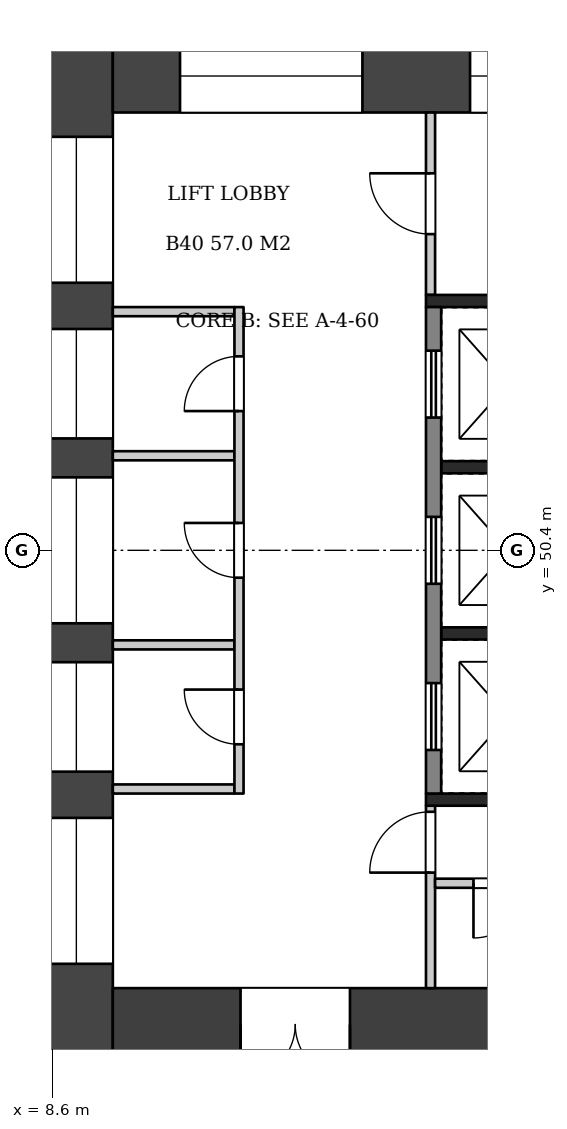
"""IFC4 building model, lengths in metres.
Left out: names, types, materials, properties, quantities, classifications, styles, units other than length and angle.
Written with IfcOpenShell. Run it as: python <this file> out.ifc"""

import sys

from ifc_helpers import new_model, si_unit, direction, frame, frame_2d, origin, place, context, subcontext, project, spatial, rectangle, extrude, element, fill, save


model = new_model("IFC4")
c1 = context("Model", 3, precision=1e-05, world=origin(), true_north=direction((0.0, 1.0)))
c2 = subcontext(c1, "Body", "Model", "MODEL_VIEW")
j1 = project(units=[si_unit("LENGTHUNIT", "METRE"), si_unit("PLANEANGLEUNIT", "RADIAN")], contexts=[c1])
p1 = place(None, origin())
s1 = spatial("IfcSite", under=j1, at=p1, CompositionType="ELEMENT")
p2 = place(p1, origin())
s2 = spatial("IfcBuilding", under=s1, at=p2, CompositionType="ELEMENT")
p3 = place(p2, frame((0.0, 0.0, 158.2)))
s3 = spatial("IfcBuildingStorey", under=s2, at=p3, CompositionType="ELEMENT", Elevation=158.2)
p4 = place(p3, frame((9.0, 58.8, 0.0), z_axis=(0.0, 0.0, 1.0), x_axis=(0.0, -1.0, 0.0)))
e1 = element("IfcWall", 1, at=p4, inside=s3, PredefinedType="SHEAR", context=c2, shape_type="SweptSolid", body=[
    extrude(rectangle(XDim=16.8, YDim=1.2, at=frame_2d((8.4, 0.0))), origin(), (0.0, 0.0, 1.0), 3.22),
])
p5 = place(p4, frame((1.6, 0.0, 0.6)))
e2 = element("IfcOpeningElement", 2, at=p5, cuts=e1, PredefinedType="OPENING", context=c2, shape_type="SweptSolid", body=[
    extrude(rectangle(XDim=2.4, YDim=2.1, at=frame_2d((1.2, 1.05))), frame((0.0, 0.61, 0.0), z_axis=(0.0, -1.0, 0.0), x_axis=(1.0, 0.0, 0.0)), (0.0, 0.0, 1.0), 1.22),
])
p6 = place(p4, frame((4.76, 0.0, 1.6)))
e3 = element("IfcOpeningElement", 3, at=p6, cuts=e1, PredefinedType="OPENING", context=c2, shape_type="SweptSolid", body=[
    extrude(rectangle(XDim=1.8, YDim=1.2, at=frame_2d((0.9, 0.6))), frame((0.0, 0.61, 0.0), z_axis=(0.0, -1.0, 0.0), x_axis=(1.0, 0.0, 0.0)), (0.0, 0.0, 1.0), 1.22),
])
p7 = place(p4, frame((7.2, 0.0, 1.6)))
e4 = element("IfcOpeningElement", 4, at=p7, cuts=e1, PredefinedType="OPENING", context=c2, shape_type="SweptSolid", body=[
    extrude(rectangle(XDim=2.4, YDim=1.2, at=frame_2d((1.2, 0.6))), frame((0.0, 0.61, 0.0), z_axis=(0.0, -1.0, 0.0), x_axis=(1.0, 0.0, 0.0)), (0.0, 0.0, 1.0), 1.22),
])
p8 = place(p4, frame((10.24, 0.0, 1.6)))
e5 = element("IfcOpeningElement", 5, at=p8, cuts=e1, PredefinedType="OPENING", context=c2, shape_type="SweptSolid", body=[
    extrude(rectangle(XDim=1.8, YDim=1.2, at=frame_2d((0.9, 0.6))), frame((0.0, 0.61, 0.0), z_axis=(0.0, -1.0, 0.0), x_axis=(1.0, 0.0, 0.0)), (0.0, 0.0, 1.0), 1.22),
])
p9 = place(p4, frame((12.8, 0.0, 0.6)))
e6 = element("IfcOpeningElement", 6, at=p9, cuts=e1, PredefinedType="OPENING", context=c2, shape_type="SweptSolid", body=[
    extrude(rectangle(XDim=2.4, YDim=2.1, at=frame_2d((1.2, 1.05))), frame((0.0, 0.61, 0.0), z_axis=(0.0, -1.0, 0.0), x_axis=(1.0, 0.0, 0.0)), (0.0, 0.0, 1.0), 1.22),
])
p10 = place(p3, frame((9.6, 58.2, 0.0), z_axis=(0.0, 0.0, 1.0), x_axis=(1.0, 0.0, 0.0)))
e7 = element("IfcWall", 7, at=p10, inside=s3, PredefinedType="SHEAR", context=c2, shape_type="SweptSolid", body=[
    extrude(rectangle(XDim=14.4, YDim=1.2, at=frame_2d((7.2, 0.0))), origin(), (0.0, 0.0, 1.0), 3.22),
])
p11 = place(p10, frame((1.105, 0.0, 0.6)))
e8 = element("IfcOpeningElement", 8, at=p11, cuts=e7, PredefinedType="OPENING", context=c2, shape_type="SweptSolid", body=[
    extrude(rectangle(XDim=3.0, YDim=2.1, at=frame_2d((1.5, 1.05))), frame((0.0, 0.61, 0.0), z_axis=(0.0, -1.0, 0.0), x_axis=(1.0, 0.0, 0.0)), (0.0, 0.0, 1.0), 1.22),
])
p12 = place(p10, frame((5.875, 0.0, 0.6)))
e9 = element("IfcOpeningElement", 9, at=p12, cuts=e7, PredefinedType="OPENING", context=c2, shape_type="SweptSolid", body=[
    extrude(rectangle(XDim=2.4, YDim=2.1, at=frame_2d((1.2, 1.05))), frame((0.0, 0.61, 0.0), z_axis=(0.0, -1.0, 0.0), x_axis=(1.0, 0.0, 0.0)), (0.0, 0.0, 1.0), 1.22),
])
p13 = place(p10, frame((9.993, 0.0, 0.5)))
e10 = element("IfcOpeningElement", 10, at=p13, cuts=e7, PredefinedType="OPENING", context=c2, shape_type="SweptSolid", body=[
    extrude(rectangle(XDim=1.2, YDim=2.4, at=frame_2d((0.6, 1.2))), frame((0.0, 0.61, 0.0), z_axis=(0.0, -1.0, 0.0), x_axis=(1.0, 0.0, 0.0)), (0.0, 0.0, 1.0), 1.22),
])
p14 = place(p10, frame((12.197, 0.0, 0.5)))
e11 = element("IfcOpeningElement", 11, at=p14, cuts=e7, PredefinedType="OPENING", context=c2, shape_type="SweptSolid", body=[
    extrude(rectangle(XDim=1.2, YDim=2.4, at=frame_2d((0.6, 1.2))), frame((0.0, 0.61, 0.0), z_axis=(0.0, -1.0, 0.0), x_axis=(1.0, 0.0, 0.0)), (0.0, 0.0, 1.0), 1.22),
])
p15 = place(p3, frame((9.6, 42.6, 0.0), z_axis=(0.0, 0.0, 1.0), x_axis=(1.0, 0.0, 0.0)))
e12 = element("IfcWall", 12, at=p15, inside=s3, PredefinedType="SHEAR", context=c2, shape_type="SweptSolid", body=[
    extrude(rectangle(XDim=14.4, YDim=1.2, at=frame_2d((7.2, 0.0))), origin(), (0.0, 0.0, 1.0), 3.22),
])
p16 = place(p15, frame((2.1, 0.0, 0.0)))
e13 = element("IfcOpeningElement", 13, at=p16, cuts=e12, PredefinedType="OPENING", context=c2, shape_type="SweptSolid", body=[
    extrude(rectangle(XDim=1.8, YDim=2.1, at=frame_2d((0.9, 1.05))), frame((0.0, 0.61, 0.0), z_axis=(0.0, -1.0, 0.0), x_axis=(1.0, 0.0, 0.0)), (0.0, 0.0, 1.0), 1.22),
])
for number, where, z_axis, x_axis in (
    (14, (9.6, 54.325, 0.0), (0.0, 0.0, 1.0), (1.0, 0.0, 0.0)),
    (15, (9.6, 46.475, 0.0), (0.0, 0.0, 1.0), (1.0, 0.0, 0.0)),
    (16, (9.6, 51.955, 0.0), (0.0, 0.0, 1.0), (1.0, 0.0, 0.0)),
    (17, (9.6, 48.845, 0.0), (0.0, 0.0, 1.0), (1.0, 0.0, 0.0)),
):
    element("IfcWall", number, at=place(p3, frame(where, z_axis=z_axis, x_axis=x_axis)), inside=s3, PredefinedType="PARTITIONING", context=c2, shape_type="SweptSolid", body=[
        extrude(rectangle(XDim=2.0, YDim=0.15, at=frame_2d((1.0, 0.0))), origin(), (0.0, 0.0, 1.0), 3.22),
    ])
p17 = place(p3, frame((11.675, 54.4, 0.0), z_axis=(0.0, 0.0, 1.0), x_axis=(0.0, -1.0, 0.0)))
e18 = element("IfcWall", 18, at=p17, inside=s3, PredefinedType="PARTITIONING", context=c2, shape_type="SweptSolid", body=[
    extrude(rectangle(XDim=8.0, YDim=0.15, at=frame_2d((4.0, 0.0))), origin(), (0.0, 0.0, 1.0), 3.22),
])
p18 = place(p17, frame((0.81, 0.0, 0.0)))
e19 = element("IfcOpeningElement", 19, at=p18, cuts=e18, PredefinedType="OPENING", context=c2, shape_type="SweptSolid", body=[
    extrude(rectangle(XDim=0.9, YDim=2.1, at=frame_2d((0.45, 1.05))), frame((0.0, 0.085, 0.0), z_axis=(0.0, -1.0, 0.0), x_axis=(1.0, 0.0, 0.0)), (0.0, 0.0, 1.0), 0.17),
])
p19 = place(p17, frame((3.55, 0.0, 0.0)))
e20 = element("IfcOpeningElement", 20, at=p19, cuts=e18, PredefinedType="OPENING", context=c2, shape_type="SweptSolid", body=[
    extrude(rectangle(XDim=0.9, YDim=2.1, at=frame_2d((0.45, 1.05))), frame((0.0, 0.085, 0.0), z_axis=(0.0, -1.0, 0.0), x_axis=(1.0, 0.0, 0.0)), (0.0, 0.0, 1.0), 0.17),
])
p20 = place(p17, frame((6.29, 0.0, 0.0)))
e21 = element("IfcOpeningElement", 21, at=p20, cuts=e18, PredefinedType="OPENING", context=c2, shape_type="SweptSolid", body=[
    extrude(rectangle(XDim=0.9, YDim=2.1, at=frame_2d((0.45, 1.05))), frame((0.0, 0.085, 0.0), z_axis=(0.0, -1.0, 0.0), x_axis=(1.0, 0.0, 0.0)), (0.0, 0.0, 1.0), 0.17),
])
for number, where, z_axis, x_axis in (
    (22, (15.0, 51.767, 0.0), (0.0, 0.0, 1.0), (1.0, 0.0, 0.0)),
    (23, (15.0, 49.033, 0.0), (0.0, 0.0, 1.0), (1.0, 0.0, 0.0)),
):
    element("IfcWall", number, at=place(p3, frame(where, z_axis=z_axis, x_axis=x_axis)), inside=s3, PredefinedType="SHEAR", context=c2, shape_type="SweptSolid", body=[
        extrude(rectangle(XDim=1.9, YDim=0.2, at=frame_2d((0.95, 0.0))), origin(), (0.0, 0.0, 1.0), 3.22),
    ])
p21 = place(p3, frame((14.875, 54.4, 0.0), z_axis=(0.0, 0.0, 1.0), x_axis=(0.0, -1.0, 0.0)))
e24 = element("IfcWall", 24, at=p21, inside=s3, PredefinedType="SHEAR", context=c2, shape_type="SweptSolid", body=[
    extrude(rectangle(XDim=8.0, YDim=0.25, at=frame_2d((4.0, 0.0))), origin(), (0.0, 0.0, 1.0), 3.22),
])
p22 = place(p21, frame((0.717, 0.0, 0.0)))
e25 = element("IfcOpeningElement", 25, at=p22, cuts=e24, PredefinedType="OPENING", context=c2, shape_type="SweptSolid", body=[
    extrude(rectangle(XDim=1.1, YDim=2.1, at=frame_2d((0.55, 1.05))), frame((0.0, 0.135, 0.0), z_axis=(0.0, -1.0, 0.0), x_axis=(1.0, 0.0, 0.0)), (0.0, 0.0, 1.0), 0.27),
])
p23 = place(p21, frame((3.45, 0.0, 0.0)))
e26 = element("IfcOpeningElement", 26, at=p23, cuts=e24, PredefinedType="OPENING", context=c2, shape_type="SweptSolid", body=[
    extrude(rectangle(XDim=1.1, YDim=2.1, at=frame_2d((0.55, 1.05))), frame((0.0, 0.135, 0.0), z_axis=(0.0, -1.0, 0.0), x_axis=(1.0, 0.0, 0.0)), (0.0, 0.0, 1.0), 0.27),
])
p24 = place(p21, frame((6.183, 0.0, 0.0)))
e27 = element("IfcOpeningElement", 27, at=p24, cuts=e24, PredefinedType="OPENING", context=c2, shape_type="SweptSolid", body=[
    extrude(rectangle(XDim=1.1, YDim=2.1, at=frame_2d((0.55, 1.05))), frame((0.0, 0.135, 0.0), z_axis=(0.0, -1.0, 0.0), x_axis=(1.0, 0.0, 0.0)), (0.0, 0.0, 1.0), 0.27),
])
p25 = place(p3, frame((14.75, 54.5, 0.0), z_axis=(0.0, 0.0, 1.0), x_axis=(1.0, 0.0, 0.0)))
e28 = element("IfcWall", 28, at=p25, inside=s3, PredefinedType="SHEAR", context=c2, shape_type="SweptSolid", body=[
    extrude(rectangle(XDim=2.4, YDim=0.2, at=frame_2d((1.2, 0.0))), origin(), (0.0, 0.0, 1.0), 3.22),
])
p26 = place(p3, frame((14.825, 57.6, 0.0), z_axis=(0.0, 0.0, 1.0), x_axis=(0.0, -1.0, 0.0)))
e29 = element("IfcWall", 29, at=p26, inside=s3, PredefinedType="PARTITIONING", context=c2, shape_type="SweptSolid", body=[
    extrude(rectangle(XDim=3.0, YDim=0.15, at=frame_2d((1.5, 0.0))), origin(), (0.0, 0.0, 1.0), 3.22),
])
p27 = place(p26, frame((1.0, 0.0, 0.0)))
e30 = element("IfcOpeningElement", 30, at=p27, cuts=e29, PredefinedType="OPENING", context=c2, shape_type="SweptSolid", body=[
    extrude(rectangle(XDim=1.0, YDim=2.1, at=frame_2d((0.5, 1.05))), frame((0.0, 0.085, 0.0), z_axis=(0.0, -1.0, 0.0), x_axis=(1.0, 0.0, 0.0)), (0.0, 0.0, 1.0), 0.17),
])
p28 = place(p3, frame((14.75, 46.3, 0.0), z_axis=(0.0, 0.0, 1.0), x_axis=(1.0, 0.0, 0.0)))
e31 = element("IfcWall", 31, at=p28, inside=s3, PredefinedType="SHEAR", context=c2, shape_type="SweptSolid", body=[
    extrude(rectangle(XDim=9.25, YDim=0.2, at=frame_2d((4.625, 0.0))), origin(), (0.0, 0.0, 1.0), 3.22),
])
p29 = place(p3, frame((14.825, 46.2, 0.0), z_axis=(0.0, 0.0, 1.0), x_axis=(0.0, -1.0, 0.0)))
e32 = element("IfcWall", 32, at=p29, inside=s3, PredefinedType="PARTITIONING", context=c2, shape_type="SweptSolid", body=[
    extrude(rectangle(XDim=3.0, YDim=0.15, at=frame_2d((1.5, 0.0))), origin(), (0.0, 0.0, 1.0), 3.22),
])
p30 = place(p29, frame((0.1, 0.0, 0.0)))
e33 = element("IfcOpeningElement", 33, at=p30, cuts=e32, PredefinedType="OPENING", context=c2, shape_type="SweptSolid", body=[
    extrude(rectangle(XDim=1.0, YDim=2.1, at=frame_2d((0.5, 1.05))), frame((0.0, 0.085, 0.0), z_axis=(0.0, -1.0, 0.0), x_axis=(1.0, 0.0, 0.0)), (0.0, 0.0, 1.0), 0.17),
])
p31 = place(p3, frame((14.9, 44.925, 0.0), z_axis=(0.0, 0.0, 1.0), x_axis=(1.0, 0.0, 0.0)))
e34 = element("IfcWall", 34, at=p31, inside=s3, PredefinedType="PARTITIONING", context=c2, shape_type="SweptSolid", body=[
    extrude(rectangle(XDim=9.1, YDim=0.15, at=frame_2d((4.55, 0.0))), origin(), (0.0, 0.0, 1.0), 3.22),
])
p32 = place(p31, frame((0.631, 0.0, 0.0)))
e35 = element("IfcOpeningElement", 35, at=p32, cuts=e34, PredefinedType="OPENING", context=c2, shape_type="SweptSolid", body=[
    extrude(rectangle(XDim=0.9, YDim=2.1, at=frame_2d((0.45, 1.05))), frame((0.0, 0.085, 0.0), z_axis=(0.0, -1.0, 0.0), x_axis=(1.0, 0.0, 0.0)), (0.0, 0.0, 1.0), 0.17),
])
p33 = place(p31, frame((2.944, 0.0, 0.0)))
e36 = element("IfcOpeningElement", 36, at=p33, cuts=e34, PredefinedType="OPENING", context=c2, shape_type="SweptSolid", body=[
    extrude(rectangle(XDim=0.9, YDim=2.1, at=frame_2d((0.45, 1.05))), frame((0.0, 0.085, 0.0), z_axis=(0.0, -1.0, 0.0), x_axis=(1.0, 0.0, 0.0)), (0.0, 0.0, 1.0), 0.17),
])
p34 = place(p31, frame((5.256, 0.0, 0.0)))
e37 = element("IfcOpeningElement", 37, at=p34, cuts=e34, PredefinedType="OPENING", context=c2, shape_type="SweptSolid", body=[
    extrude(rectangle(XDim=0.9, YDim=2.1, at=frame_2d((0.45, 1.05))), frame((0.0, 0.085, 0.0), z_axis=(0.0, -1.0, 0.0), x_axis=(1.0, 0.0, 0.0)), (0.0, 0.0, 1.0), 0.17),
])
p35 = place(p31, frame((7.569, 0.0, 0.0)))
e38 = element("IfcOpeningElement", 38, at=p35, cuts=e34, PredefinedType="OPENING", context=c2, shape_type="SweptSolid", body=[
    extrude(rectangle(XDim=0.9, YDim=2.1, at=frame_2d((0.45, 1.05))), frame((0.0, 0.085, 0.0), z_axis=(0.0, -1.0, 0.0), x_axis=(1.0, 0.0, 0.0)), (0.0, 0.0, 1.0), 0.17),
])
p36 = place(p16, frame((1.8, 0.0, 0.0), z_axis=(0.0, 0.0, 1.0), x_axis=(-1.0, 0.0, 0.0)))
e39 = element("IfcDoor", 39, at=p36, inside=s3, OperationType="DOUBLE_DOOR_SINGLE_SWING", PredefinedType="DOOR", context=c2, shape_type="SweptSolid", body=[
    extrude(rectangle(XDim=1.8, YDim=2.1, at=frame_2d((0.9, 1.05))), frame((0.0, 0.025, 0.0), z_axis=(0.0, -1.0, 0.0), x_axis=(1.0, 0.0, 0.0)), (0.0, 0.0, 1.0), 0.05),
])
fill(e13, e39)
p37 = place(p18, frame((0.9, 0.0, 0.0), z_axis=(0.0, 0.0, 1.0), x_axis=(-1.0, 0.0, 0.0)))
e40 = element("IfcDoor", 40, at=p37, inside=s3, OperationType="SINGLE_SWING_LEFT", PredefinedType="DOOR", context=c2, shape_type="SweptSolid", body=[
    extrude(rectangle(XDim=0.9, YDim=2.1, at=frame_2d((0.45, 1.05))), frame((0.0, 0.025, 0.0), z_axis=(0.0, -1.0, 0.0), x_axis=(1.0, 0.0, 0.0)), (0.0, 0.0, 1.0), 0.05),
])
fill(e19, e40)
p38 = place(p19, frame((0.9, 0.0, 0.0), z_axis=(0.0, 0.0, 1.0), x_axis=(-1.0, 0.0, 0.0)))
e41 = element("IfcDoor", 41, at=p38, inside=s3, OperationType="SINGLE_SWING_RIGHT", PredefinedType="DOOR", context=c2, shape_type="SweptSolid", body=[
    extrude(rectangle(XDim=0.9, YDim=2.1, at=frame_2d((0.45, 1.05))), frame((0.0, 0.025, 0.0), z_axis=(0.0, -1.0, 0.0), x_axis=(1.0, 0.0, 0.0)), (0.0, 0.0, 1.0), 0.05),
])
fill(e20, e41)
p39 = place(p20, frame((0.9, 0.0, 0.0), z_axis=(0.0, 0.0, 1.0), x_axis=(-1.0, 0.0, 0.0)))
e42 = element("IfcDoor", 42, at=p39, inside=s3, OperationType="SINGLE_SWING_RIGHT", PredefinedType="DOOR", context=c2, shape_type="SweptSolid", body=[
    extrude(rectangle(XDim=0.9, YDim=2.1, at=frame_2d((0.45, 1.05))), frame((0.0, 0.025, 0.0), z_axis=(0.0, -1.0, 0.0), x_axis=(1.0, 0.0, 0.0)), (0.0, 0.0, 1.0), 0.05),
])
fill(e21, e42)
p40 = place(p22, origin())
e43 = element("IfcDoor", 43, at=p40, inside=s3, OperationType="DOUBLE_DOOR_SLIDING", PredefinedType="DOOR", context=c2, shape_type="SweptSolid", body=[
    extrude(rectangle(XDim=1.1, YDim=2.1, at=frame_2d((0.55, 1.05))), frame((0.0, 0.025, 0.0), z_axis=(0.0, -1.0, 0.0), x_axis=(1.0, 0.0, 0.0)), (0.0, 0.0, 1.0), 0.05),
])
fill(e25, e43)
p41 = place(p23, origin())
e44 = element("IfcDoor", 44, at=p41, inside=s3, OperationType="DOUBLE_DOOR_SLIDING", PredefinedType="DOOR", context=c2, shape_type="SweptSolid", body=[
    extrude(rectangle(XDim=1.1, YDim=2.1, at=frame_2d((0.55, 1.05))), frame((0.0, 0.025, 0.0), z_axis=(0.0, -1.0, 0.0), x_axis=(1.0, 0.0, 0.0)), (0.0, 0.0, 1.0), 0.05),
])
fill(e26, e44)
p42 = place(p24, origin())
e45 = element("IfcDoor", 45, at=p42, inside=s3, OperationType="DOUBLE_DOOR_SLIDING", PredefinedType="DOOR", context=c2, shape_type="SweptSolid", body=[
    extrude(rectangle(XDim=1.1, YDim=2.1, at=frame_2d((0.55, 1.05))), frame((0.0, 0.025, 0.0), z_axis=(0.0, -1.0, 0.0), x_axis=(1.0, 0.0, 0.0)), (0.0, 0.0, 1.0), 0.05),
])
fill(e27, e45)
p43 = place(p27, frame((1.0, 0.0, 0.0), z_axis=(0.0, 0.0, 1.0), x_axis=(-1.0, 0.0, 0.0)))
e46 = element("IfcDoor", 46, at=p43, inside=s3, OperationType="SINGLE_SWING_RIGHT", PredefinedType="DOOR", context=c2, shape_type="SweptSolid", body=[
    extrude(rectangle(XDim=1.0, YDim=2.1, at=frame_2d((0.5, 1.05))), frame((0.0, 0.025, 0.0), z_axis=(0.0, -1.0, 0.0), x_axis=(1.0, 0.0, 0.0)), (0.0, 0.0, 1.0), 0.05),
])
fill(e30, e46)
p44 = place(p30, frame((1.0, 0.0, 0.0), z_axis=(0.0, 0.0, 1.0), x_axis=(-1.0, 0.0, 0.0)))
e47 = element("IfcDoor", 47, at=p44, inside=s3, OperationType="SINGLE_SWING_LEFT", PredefinedType="DOOR", context=c2, shape_type="SweptSolid", body=[
    extrude(rectangle(XDim=1.0, YDim=2.1, at=frame_2d((0.5, 1.05))), frame((0.0, 0.025, 0.0), z_axis=(0.0, -1.0, 0.0), x_axis=(1.0, 0.0, 0.0)), (0.0, 0.0, 1.0), 0.05),
])
fill(e33, e47)
p45 = place(p32, frame((0.9, 0.0, 0.0), z_axis=(0.0, 0.0, 1.0), x_axis=(-1.0, 0.0, 0.0)))
e48 = element("IfcDoor", 48, at=p45, inside=s3, OperationType="SINGLE_SWING_RIGHT", PredefinedType="DOOR", context=c2, shape_type="SweptSolid", body=[
    extrude(rectangle(XDim=0.9, YDim=2.1, at=frame_2d((0.45, 1.05))), frame((0.0, 0.025, 0.0), z_axis=(0.0, -1.0, 0.0), x_axis=(1.0, 0.0, 0.0)), (0.0, 0.0, 1.0), 0.05),
])
fill(e35, e48)
p46 = place(p5, origin())
e49 = element("IfcWindow", 49, at=p46, inside=s3, PartitioningType="SINGLE_PANEL", PredefinedType="WINDOW", context=c2, shape_type="SweptSolid", body=[
    extrude(rectangle(XDim=2.4, YDim=2.1, at=frame_2d((1.2, 1.05))), frame((0.0, 0.03, 0.0), z_axis=(0.0, -1.0, 0.0), x_axis=(1.0, 0.0, 0.0)), (0.0, 0.0, 1.0), 0.06),
])
fill(e2, e49)
p47 = place(p6, origin())
e50 = element("IfcWindow", 50, at=p47, inside=s3, PartitioningType="SINGLE_PANEL", PredefinedType="WINDOW", context=c2, shape_type="SweptSolid", body=[
    extrude(rectangle(XDim=1.8, YDim=1.2, at=frame_2d((0.9, 0.6))), frame((0.0, 0.03, 0.0), z_axis=(0.0, -1.0, 0.0), x_axis=(1.0, 0.0, 0.0)), (0.0, 0.0, 1.0), 0.06),
])
fill(e3, e50)
p48 = place(p7, origin())
e51 = element("IfcWindow", 51, at=p48, inside=s3, PartitioningType="SINGLE_PANEL", PredefinedType="WINDOW", context=c2, shape_type="SweptSolid", body=[
    extrude(rectangle(XDim=2.4, YDim=1.2, at=frame_2d((1.2, 0.6))), frame((0.0, 0.03, 0.0), z_axis=(0.0, -1.0, 0.0), x_axis=(1.0, 0.0, 0.0)), (0.0, 0.0, 1.0), 0.06),
])
fill(e4, e51)
p49 = place(p8, origin())
e52 = element("IfcWindow", 52, at=p49, inside=s3, PartitioningType="SINGLE_PANEL", PredefinedType="WINDOW", context=c2, shape_type="SweptSolid", body=[
    extrude(rectangle(XDim=1.8, YDim=1.2, at=frame_2d((0.9, 0.6))), frame((0.0, 0.03, 0.0), z_axis=(0.0, -1.0, 0.0), x_axis=(1.0, 0.0, 0.0)), (0.0, 0.0, 1.0), 0.06),
])
fill(e5, e52)
p50 = place(p9, origin())
e53 = element("IfcWindow", 53, at=p50, inside=s3, PartitioningType="SINGLE_PANEL", PredefinedType="WINDOW", context=c2, shape_type="SweptSolid", body=[
    extrude(rectangle(XDim=2.4, YDim=2.1, at=frame_2d((1.2, 1.05))), frame((0.0, 0.03, 0.0), z_axis=(0.0, -1.0, 0.0), x_axis=(1.0, 0.0, 0.0)), (0.0, 0.0, 1.0), 0.06),
])
fill(e6, e53)
p51 = place(p11, origin())
e54 = element("IfcWindow", 54, at=p51, inside=s3, PartitioningType="SINGLE_PANEL", PredefinedType="WINDOW", context=c2, shape_type="SweptSolid", body=[
    extrude(rectangle(XDim=3.0, YDim=2.1, at=frame_2d((1.5, 1.05))), frame((0.0, 0.03, 0.0), z_axis=(0.0, -1.0, 0.0), x_axis=(1.0, 0.0, 0.0)), (0.0, 0.0, 1.0), 0.06),
])
fill(e8, e54)
p52 = place(p12, origin())
e55 = element("IfcWindow", 55, at=p52, inside=s3, PartitioningType="SINGLE_PANEL", PredefinedType="WINDOW", context=c2, shape_type="SweptSolid", body=[
    extrude(rectangle(XDim=2.4, YDim=2.1, at=frame_2d((1.2, 1.05))), frame((0.0, 0.03, 0.0), z_axis=(0.0, -1.0, 0.0), x_axis=(1.0, 0.0, 0.0)), (0.0, 0.0, 1.0), 0.06),
])
fill(e9, e55)
save(model, sys.argv[1])
